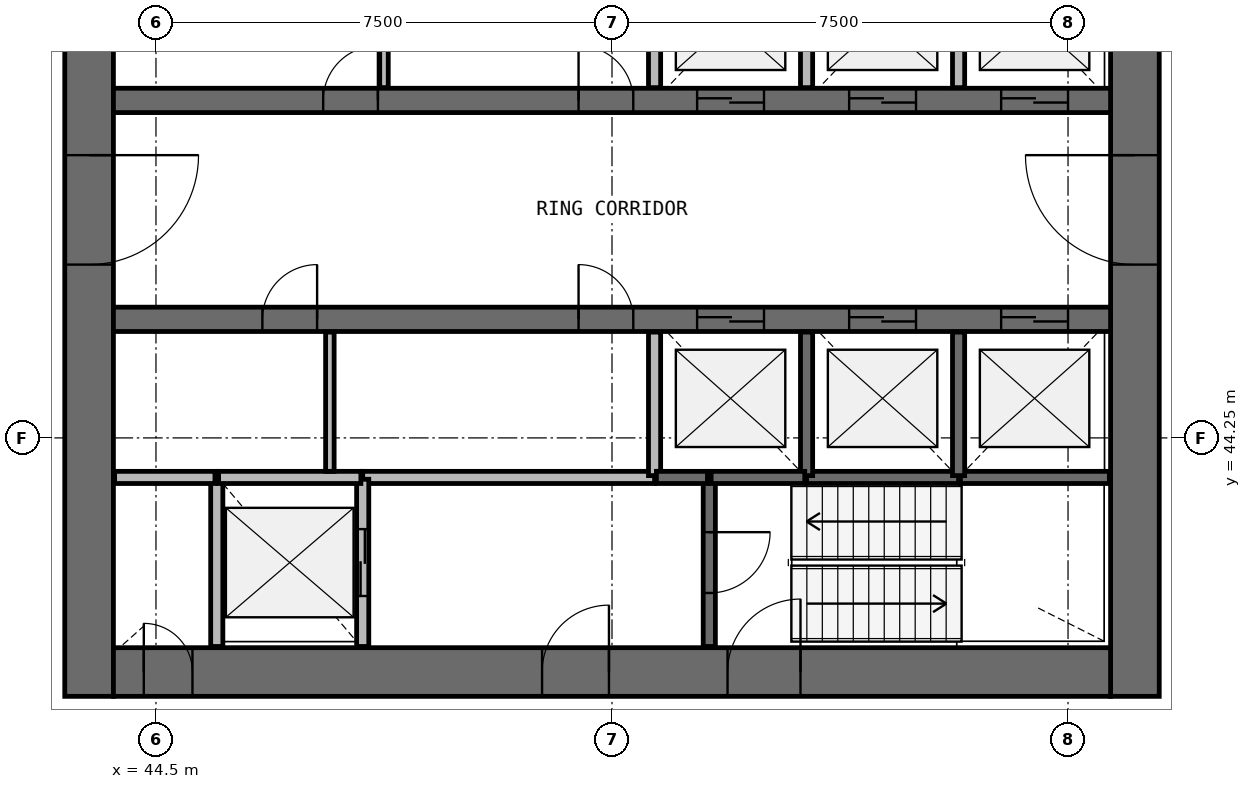
"""IFC4 building model, lengths in metres.
Left out: names, types, materials, properties, quantities, classifications, styles, units other than length and angle.
Written with IfcOpenShell. Run it as: python <this file> out.ifc"""

import sys

from ifc_helpers import new_model, si_unit, direction, frame, frame_2d, origin, place, context, subcontext, project, spatial, rectangle, extrude, source, transform, mapped, element, fill, save


model = new_model("IFC4")
c1 = context("Model", 3, precision=1e-05, world=origin(), true_north=direction((0.0, 1.0)))
c2 = subcontext(c1, "Body", "Model", "MODEL_VIEW")
j1 = project(units=[si_unit("LENGTHUNIT", "METRE"), si_unit("PLANEANGLEUNIT", "RADIAN")], contexts=[c1])
p1 = place(None, origin())
s1 = spatial("IfcSite", under=j1, at=p1, CompositionType="ELEMENT")
p2 = place(p1, origin())
s2 = spatial("IfcBuilding", under=s1, at=p2, CompositionType="ELEMENT")
p3 = place(p2, frame((0.0, 0.0, 156.5)))
s3 = spatial("IfcBuildingStorey", under=s2, at=p3, CompositionType="ELEMENT", Elevation=156.5)
p4 = place(p3, frame((60.6, 40.0, 0.0), z_axis=(0.0, 0.0, 1.0), x_axis=(0.0, 1.0, 0.0)))
e1 = element("IfcWall", 1, at=p4, inside=s3, PredefinedType="SHEAR", context=c2, shape_type="SweptSolid", body=[
    extrude(rectangle(XDim=16.0, YDim=0.8, at=frame_2d((8.0, 0.0))), origin(), (0.0, 0.0, 1.0), 3.9),
])
p5 = place(p4, frame((7.1, 0.0, 0.0)))
e2 = element("IfcOpeningElement", 2, at=p5, cuts=e1, PredefinedType="OPENING", context=c2, shape_type="SweptSolid", body=[
    extrude(rectangle(XDim=1.8, YDim=2.1, at=frame_2d((0.9, 1.05))), frame((0.0, 0.41, 0.0), z_axis=(0.0, -1.0, 0.0), x_axis=(1.0, 0.0, 0.0)), (0.0, 0.0, 1.0), 0.82),
])
p6 = place(p3, frame((43.4, 56.0, 0.0), z_axis=(0.0, 0.0, 1.0), x_axis=(0.0, -1.0, 0.0)))
e3 = element("IfcWall", 3, at=p6, inside=s3, PredefinedType="SHEAR", context=c2, shape_type="SweptSolid", body=[
    extrude(rectangle(XDim=16.0, YDim=0.8, at=frame_2d((8.0, 0.0))), origin(), (0.0, 0.0, 1.0), 3.9),
])
p7 = place(p6, frame((7.1, 0.0, 0.0)))
e4 = element("IfcOpeningElement", 4, at=p7, cuts=e3, PredefinedType="OPENING", context=c2, shape_type="SweptSolid", body=[
    extrude(rectangle(XDim=1.8, YDim=2.1, at=frame_2d((0.9, 1.05))), frame((0.0, 0.41, 0.0), z_axis=(0.0, -1.0, 0.0), x_axis=(1.0, 0.0, 0.0)), (0.0, 0.0, 1.0), 0.82),
])
p8 = place(p3, frame((43.8, 40.4, 0.0), z_axis=(0.0, 0.0, 1.0), x_axis=(1.0, 0.0, 0.0)))
e5 = element("IfcWall", 5, at=p8, inside=s3, PredefinedType="SHEAR", context=c2, shape_type="SweptSolid", body=[
    extrude(rectangle(XDim=16.4, YDim=0.8, at=frame_2d((8.2, 0.0))), origin(), (0.0, 0.0, 1.0), 3.9),
])
p9 = place(p8, frame((10.1, 0.0, 0.0)))
e6 = element("IfcOpeningElement", 6, at=p9, cuts=e5, PredefinedType="OPENING", context=c2, shape_type="SweptSolid", body=[
    extrude(rectangle(XDim=1.2, YDim=2.1, at=frame_2d((0.6, 1.05))), frame((0.0, 0.41, 0.0), z_axis=(0.0, -1.0, 0.0), x_axis=(1.0, 0.0, 0.0)), (0.0, 0.0, 1.0), 0.82),
])
p10 = place(p8, frame((7.05, 0.0, 0.0)))
e7 = element("IfcOpeningElement", 7, at=p10, cuts=e5, PredefinedType="OPENING", context=c2, shape_type="SweptSolid", body=[
    extrude(rectangle(XDim=1.1, YDim=2.1, at=frame_2d((0.55, 1.05))), frame((0.0, 0.41, 0.0), z_axis=(0.0, -1.0, 0.0), x_axis=(1.0, 0.0, 0.0)), (0.0, 0.0, 1.0), 0.82),
])
p11 = place(p8, frame((0.5, 0.0, 0.0)))
e8 = element("IfcOpeningElement", 8, at=p11, cuts=e5, PredefinedType="OPENING", context=c2, shape_type="SweptSolid", body=[
    extrude(rectangle(XDim=0.8, YDim=2.1, at=frame_2d((0.4, 1.05))), frame((0.0, 0.41, 0.0), z_axis=(0.0, -1.0, 0.0), x_axis=(1.0, 0.0, 0.0)), (0.0, 0.0, 1.0), 0.82),
])
p12 = place(p3, frame((43.8, 49.8, 0.0), z_axis=(0.0, 0.0, 1.0), x_axis=(1.0, 0.0, 0.0)))
e9 = element("IfcWall", 9, at=p12, inside=s3, PredefinedType="SHEAR", context=c2, shape_type="SweptSolid", body=[
    extrude(rectangle(XDim=16.4, YDim=0.4, at=frame_2d((8.2, 0.0))), origin(), (0.0, 0.0, 1.0), 3.9),
])
p13 = place(p12, frame((9.6, 0.0, 0.0)))
e10 = element("IfcOpeningElement", 10, at=p13, cuts=e9, PredefinedType="OPENING", context=c2, shape_type="SweptSolid", body=[
    extrude(rectangle(XDim=1.1, YDim=2.1, at=frame_2d((0.55, 1.05))), frame((0.0, 0.21, 0.0), z_axis=(0.0, -1.0, 0.0), x_axis=(1.0, 0.0, 0.0)), (0.0, 0.0, 1.0), 0.42),
])
p14 = place(p12, frame((12.1, 0.0, 0.0)))
e11 = element("IfcOpeningElement", 11, at=p14, cuts=e9, PredefinedType="OPENING", context=c2, shape_type="SweptSolid", body=[
    extrude(rectangle(XDim=1.1, YDim=2.1, at=frame_2d((0.55, 1.05))), frame((0.0, 0.21, 0.0), z_axis=(0.0, -1.0, 0.0), x_axis=(1.0, 0.0, 0.0)), (0.0, 0.0, 1.0), 0.42),
])
p15 = place(p12, frame((14.6, 0.0, 0.0)))
e12 = element("IfcOpeningElement", 12, at=p15, cuts=e9, PredefinedType="OPENING", context=c2, shape_type="SweptSolid", body=[
    extrude(rectangle(XDim=1.1, YDim=2.1, at=frame_2d((0.55, 1.05))), frame((0.0, 0.21, 0.0), z_axis=(0.0, -1.0, 0.0), x_axis=(1.0, 0.0, 0.0)), (0.0, 0.0, 1.0), 0.42),
])
p16 = place(p12, frame((3.45, 0.0, 0.0)))
e13 = element("IfcOpeningElement", 13, at=p16, cuts=e9, PredefinedType="OPENING", context=c2, shape_type="SweptSolid", body=[
    extrude(rectangle(XDim=0.9, YDim=2.1, at=frame_2d((0.45, 1.05))), frame((0.0, 0.21, 0.0), z_axis=(0.0, -1.0, 0.0), x_axis=(1.0, 0.0, 0.0)), (0.0, 0.0, 1.0), 0.42),
])
p17 = place(p12, frame((7.65, 0.0, 0.0)))
e14 = element("IfcOpeningElement", 14, at=p17, cuts=e9, PredefinedType="OPENING", context=c2, shape_type="SweptSolid", body=[
    extrude(rectangle(XDim=0.9, YDim=2.1, at=frame_2d((0.45, 1.05))), frame((0.0, 0.21, 0.0), z_axis=(0.0, -1.0, 0.0), x_axis=(1.0, 0.0, 0.0)), (0.0, 0.0, 1.0), 0.42),
])
p18 = place(p3, frame((43.8, 46.2, 0.0), z_axis=(0.0, 0.0, 1.0), x_axis=(1.0, 0.0, 0.0)))
e15 = element("IfcWall", 15, at=p18, inside=s3, PredefinedType="SHEAR", context=c2, shape_type="SweptSolid", body=[
    extrude(rectangle(XDim=16.4, YDim=0.4, at=frame_2d((8.2, 0.0))), origin(), (0.0, 0.0, 1.0), 3.9),
])
p19 = place(p18, frame((9.6, 0.0, 0.0)))
e16 = element("IfcOpeningElement", 16, at=p19, cuts=e15, PredefinedType="OPENING", context=c2, shape_type="SweptSolid", body=[
    extrude(rectangle(XDim=1.1, YDim=2.1, at=frame_2d((0.55, 1.05))), frame((0.0, 0.21, 0.0), z_axis=(0.0, -1.0, 0.0), x_axis=(1.0, 0.0, 0.0)), (0.0, 0.0, 1.0), 0.42),
])
p20 = place(p18, frame((12.1, 0.0, 0.0)))
e17 = element("IfcOpeningElement", 17, at=p20, cuts=e15, PredefinedType="OPENING", context=c2, shape_type="SweptSolid", body=[
    extrude(rectangle(XDim=1.1, YDim=2.1, at=frame_2d((0.55, 1.05))), frame((0.0, 0.21, 0.0), z_axis=(0.0, -1.0, 0.0), x_axis=(1.0, 0.0, 0.0)), (0.0, 0.0, 1.0), 0.42),
])
p21 = place(p18, frame((14.6, 0.0, 0.0)))
e18 = element("IfcOpeningElement", 18, at=p21, cuts=e15, PredefinedType="OPENING", context=c2, shape_type="SweptSolid", body=[
    extrude(rectangle(XDim=1.1, YDim=2.1, at=frame_2d((0.55, 1.05))), frame((0.0, 0.21, 0.0), z_axis=(0.0, -1.0, 0.0), x_axis=(1.0, 0.0, 0.0)), (0.0, 0.0, 1.0), 0.42),
])
p22 = place(p18, frame((2.45, 0.0, 0.0)))
e19 = element("IfcOpeningElement", 19, at=p22, cuts=e15, PredefinedType="OPENING", context=c2, shape_type="SweptSolid", body=[
    extrude(rectangle(XDim=0.9, YDim=2.1, at=frame_2d((0.45, 1.05))), frame((0.0, 0.21, 0.0), z_axis=(0.0, -1.0, 0.0), x_axis=(1.0, 0.0, 0.0)), (0.0, 0.0, 1.0), 0.42),
])
p23 = place(p18, frame((7.65, 0.0, 0.0)))
e20 = element("IfcOpeningElement", 20, at=p23, cuts=e15, PredefinedType="OPENING", context=c2, shape_type="SweptSolid", body=[
    extrude(rectangle(XDim=0.9, YDim=2.1, at=frame_2d((0.45, 1.05))), frame((0.0, 0.21, 0.0), z_axis=(0.0, -1.0, 0.0), x_axis=(1.0, 0.0, 0.0)), (0.0, 0.0, 1.0), 0.42),
])
p24 = place(p3, frame((52.7, 43.6, 0.0), z_axis=(0.0, 0.0, 1.0), x_axis=(-1.0, 0.0, 0.0)))
e21 = element("IfcWall", 21, at=p24, inside=s3, PredefinedType="SOLIDWALL", context=c2, shape_type="SweptSolid", body=[
    extrude(rectangle(XDim=4.8, YDim=0.2, at=frame_2d((2.4, 0.0))), origin(), (0.0, 0.0, 1.0), 3.58),
])
p25 = place(p3, frame((45.5, 43.6, 0.0), z_axis=(0.0, 0.0, 1.0), x_axis=(0.0, -1.0, 0.0)))
e22 = element("IfcWall", 22, at=p25, inside=s3, PredefinedType="SOLIDWALL", context=c2, shape_type="SweptSolid", body=[
    extrude(rectangle(XDim=2.78, YDim=0.2, at=frame_2d((1.39, 0.0))), origin(), (0.0, 0.0, 1.0), 3.58),
])
p26 = place(p3, frame((47.9, 40.82, 0.0), z_axis=(0.0, 0.0, 1.0), x_axis=(0.0, 1.0, 0.0)))
e23 = element("IfcWall", 23, at=p26, inside=s3, PredefinedType="SOLIDWALL", context=c2, shape_type="SweptSolid", body=[
    extrude(rectangle(XDim=2.75, YDim=0.2, at=frame_2d((1.375, 0.0))), origin(), (0.0, 0.0, 1.0), 3.58),
])
p27 = place(p26, frame((0.83, 0.0, 0.0)))
e24 = element("IfcOpeningElement", 24, at=p27, cuts=e23, PredefinedType="OPENING", context=c2, shape_type="SweptSolid", body=[
    extrude(rectangle(XDim=1.1, YDim=2.1, at=frame_2d((0.55, 1.05))), frame((0.0, 0.11, 0.0), z_axis=(0.0, -1.0, 0.0), x_axis=(1.0, 0.0, 0.0)), (0.0, 0.0, 1.0), 0.22),
])
p28 = place(p3, frame((53.6, 43.6, 0.0), z_axis=(0.0, 0.0, 1.0), x_axis=(0.0, -1.0, 0.0)))
e25 = element("IfcWall", 25, at=p28, inside=s3, PredefinedType="SOLIDWALL", context=c2, shape_type="SweptSolid", body=[
    extrude(rectangle(XDim=2.78, YDim=0.2, at=frame_2d((1.39, 0.0))), origin(), (0.0, 0.0, 1.0), 3.58),
])
p29 = place(p28, frame((0.9, 0.0, 0.0)))
e26 = element("IfcOpeningElement", 26, at=p29, cuts=e25, PredefinedType="OPENING", context=c2, shape_type="SweptSolid", body=[
    extrude(rectangle(XDim=1.0, YDim=2.1, at=frame_2d((0.5, 1.05))), frame((0.0, 0.11, 0.0), z_axis=(0.0, -1.0, 0.0), x_axis=(1.0, 0.0, 0.0)), (0.0, 0.0, 1.0), 0.22),
])
p30 = place(p3, frame((55.2, 43.6, 0.0), z_axis=(0.0, 0.0, 1.0), x_axis=(1.0, 0.0, 0.0)))
e27 = element("IfcWall", 27, at=p30, inside=s3, PredefinedType="SOLIDWALL", context=c2, shape_type="SweptSolid", body=[
    extrude(rectangle(XDim=2.5, YDim=0.2, at=frame_2d((1.25, 0.0))), origin(), (0.0, 0.0, 1.0), 3.58),
])
p31 = place(p3, frame((57.73, 43.6, 0.0), z_axis=(0.0, 0.0, 1.0), x_axis=(1.0, 0.0, 0.0)))
e28 = element("IfcWall", 28, at=p31, inside=s3, PredefinedType="SOLIDWALL", context=c2, shape_type="SweptSolid", body=[
    extrude(rectangle(XDim=2.45, YDim=0.2, at=frame_2d((1.225, 0.0))), origin(), (0.0, 0.0, 1.0), 3.58),
])
p32 = place(p3, frame((47.87, 43.6, 0.0), z_axis=(0.0, 0.0, 1.0), x_axis=(-1.0, 0.0, 0.0)))
e29 = element("IfcWall", 29, at=p32, inside=s3, PredefinedType="SOLIDWALL", context=c2, shape_type="SweptSolid", body=[
    extrude(rectangle(XDim=2.34, YDim=0.2, at=frame_2d((1.17, 0.0))), origin(), (0.0, 0.0, 1.0), 3.58),
])
for number, where, z_axis, x_axis in (
    (30, (52.7, 45.99, 0.0), (0.0, 0.0, 1.0), (0.0, -1.0, 0.0)),
    (31, (52.7, 52.37, 0.0), (0.0, 0.0, 1.0), (0.0, -1.0, 0.0)),
    (32, (55.2, 43.63, 0.0), (0.0, 0.0, 1.0), (0.0, 1.0, 0.0)),
    (33, (55.2, 50.01, 0.0), (0.0, 0.0, 1.0), (0.0, 1.0, 0.0)),
    (34, (57.7, 43.63, 0.0), (0.0, 0.0, 1.0), (0.0, 1.0, 0.0)),
):
    element("IfcWall", number, at=place(p3, frame(where, z_axis=z_axis, x_axis=x_axis)), inside=s3, PredefinedType="SOLIDWALL", context=c2, shape_type="SweptSolid", body=[
        extrude(rectangle(XDim=2.36, YDim=0.2, at=frame_2d((1.18, 0.0))), origin(), (0.0, 0.0, 1.0), 3.58),
    ])
p33 = place(p3, frame((57.7, 50.01, 0.0), z_axis=(0.0, 0.0, 1.0), x_axis=(0.0, 1.0, 0.0)))
e35 = element("IfcWall", 35, at=p33, inside=s3, PredefinedType="SOLIDWALL", context=c2, shape_type="SweptSolid", body=[
    extrude(rectangle(XDim=2.39, YDim=0.2, at=frame_2d((1.195, 0.0))), origin(), (0.0, 0.0, 1.0), 3.58),
])
p34 = place(p3, frame((45.47, 43.6, 0.0), z_axis=(0.0, 0.0, 1.0), x_axis=(-1.0, 0.0, 0.0)))
e36 = element("IfcWall", 36, at=p34, inside=s3, PredefinedType="SOLIDWALL", context=c2, shape_type="SweptSolid", body=[
    extrude(rectangle(XDim=1.65, YDim=0.2, at=frame_2d((0.825, 0.0))), origin(), (0.0, 0.0, 1.0), 3.58),
])
p35 = place(p3, frame((53.63, 43.6, 0.0), z_axis=(0.0, 0.0, 1.0), x_axis=(1.0, 0.0, 0.0)))
e37 = element("IfcWall", 37, at=p35, inside=s3, PredefinedType="SOLIDWALL", context=c2, shape_type="SweptSolid", body=[
    extrude(rectangle(XDim=1.54, YDim=0.2, at=frame_2d((0.77, 0.0))), origin(), (0.0, 0.0, 1.0), 3.58),
])
p36 = place(p3, frame((52.73, 43.6, 0.0), z_axis=(0.0, 0.0, 1.0), x_axis=(1.0, 0.0, 0.0)))
e38 = element("IfcWall", 38, at=p36, inside=s3, PredefinedType="SOLIDWALL", context=c2, shape_type="SweptSolid", body=[
    extrude(rectangle(XDim=0.84, YDim=0.2, at=frame_2d((0.42, 0.0))), origin(), (0.0, 0.0, 1.0), 3.58),
])
for number, where, z_axis, x_axis in (
    (39, (47.36, 43.7, 0.0), (0.0, 0.0, 1.0), (0.0, 1.0, 0.0)),
    (40, (48.25, 50.01, 0.0), (0.0, 0.0, 1.0), (0.0, 1.0, 0.0)),
):
    element("IfcWall", number, at=place(p3, frame(where, z_axis=z_axis, x_axis=x_axis)), inside=s3, PredefinedType="PARTITIONING", context=c2, shape_type="SweptSolid", body=[
        extrude(rectangle(XDim=2.29, YDim=0.14, at=frame_2d((1.145, 0.0))), origin(), (0.0, 0.0, 1.0), 2.88),
    ])
m1 = source(origin(), c2, "Body", "SweptSolid", [
    extrude(rectangle(XDim=1.8, YDim=2.1, at=frame_2d((0.9, 1.05))), frame((0.0, 0.025, 0.0), z_axis=(0.0, -1.0, 0.0), x_axis=(1.0, 0.0, 0.0)), (0.0, 0.0, 1.0), 0.05),
])
p37 = place(p7, origin())
e41 = element("IfcDoor", 41, at=p37, inside=s3, OperationType="SINGLE_SWING_LEFT", PredefinedType="DOOR", context=c2, shape_type="MappedRepresentation", body=[
    mapped(m1, transform((0.0, 0.0, 0.0), scale=1.0)),
])
fill(e4, e41)
p38 = place(p5, origin())
e42 = element("IfcDoor", 42, at=p38, inside=s3, OperationType="SINGLE_SWING_RIGHT", PredefinedType="DOOR", context=c2, shape_type="MappedRepresentation", body=[
    mapped(m1, transform((0.0, 0.0, 0.0), scale=1.0)),
])
fill(e2, e42)
m2 = source(origin(), c2, "Body", "SweptSolid", [
    extrude(rectangle(XDim=1.1, YDim=2.1, at=frame_2d((0.55, 1.05))), frame((0.0, 0.025, 0.0), z_axis=(0.0, -1.0, 0.0), x_axis=(1.0, 0.0, 0.0)), (0.0, 0.0, 1.0), 0.05),
])
p39 = place(p13, origin())
e43 = element("IfcDoor", 43, at=p39, inside=s3, OperationType="DOUBLE_DOOR_SLIDING", PredefinedType="USERDEFINED", context=c2, shape_type="MappedRepresentation", body=[
    mapped(m2, transform((0.0, 0.0, 0.0), scale=1.0)),
])
fill(e10, e43)
p40 = place(p14, origin())
e44 = element("IfcDoor", 44, at=p40, inside=s3, OperationType="DOUBLE_DOOR_SLIDING", PredefinedType="USERDEFINED", context=c2, shape_type="MappedRepresentation", body=[
    mapped(m2, transform((0.0, 0.0, 0.0), scale=1.0)),
])
fill(e11, e44)
p41 = place(p15, origin())
e45 = element("IfcDoor", 45, at=p41, inside=s3, OperationType="DOUBLE_DOOR_SLIDING", PredefinedType="USERDEFINED", context=c2, shape_type="MappedRepresentation", body=[
    mapped(m2, transform((0.0, 0.0, 0.0), scale=1.0)),
])
fill(e12, e45)
p42 = place(p19, origin())
e46 = element("IfcDoor", 46, at=p42, inside=s3, OperationType="DOUBLE_DOOR_SLIDING", PredefinedType="USERDEFINED", context=c2, shape_type="MappedRepresentation", body=[
    mapped(m2, transform((0.0, 0.0, 0.0), scale=1.0)),
])
fill(e16, e46)
p43 = place(p20, origin())
e47 = element("IfcDoor", 47, at=p43, inside=s3, OperationType="DOUBLE_DOOR_SLIDING", PredefinedType="USERDEFINED", context=c2, shape_type="MappedRepresentation", body=[
    mapped(m2, transform((0.0, 0.0, 0.0), scale=1.0)),
])
fill(e17, e47)
p44 = place(p21, origin())
e48 = element("IfcDoor", 48, at=p44, inside=s3, OperationType="DOUBLE_DOOR_SLIDING", PredefinedType="USERDEFINED", context=c2, shape_type="MappedRepresentation", body=[
    mapped(m2, transform((0.0, 0.0, 0.0), scale=1.0)),
])
fill(e18, e48)
p45 = place(p27, origin())
e49 = element("IfcDoor", 49, at=p45, inside=s3, OperationType="DOUBLE_DOOR_SLIDING", PredefinedType="USERDEFINED", context=c2, shape_type="MappedRepresentation", body=[
    mapped(m2, transform((0.0, 0.0, 0.0), scale=1.0)),
])
fill(e24, e49)
m3 = source(origin(), c2, "Body", "SweptSolid", [
    extrude(rectangle(XDim=1.2, YDim=2.1, at=frame_2d((0.6, 1.05))), frame((0.0, 0.025, 0.0), z_axis=(0.0, -1.0, 0.0), x_axis=(1.0, 0.0, 0.0)), (0.0, 0.0, 1.0), 0.05),
])
p46 = place(p9, origin())
e50 = element("IfcDoor", 50, at=p46, inside=s3, OperationType="SINGLE_SWING_RIGHT", PredefinedType="DOOR", context=c2, shape_type="MappedRepresentation", body=[
    mapped(m3, transform((0.0, 0.0, 0.0), scale=1.0)),
])
fill(e6, e50)
m4 = source(origin(), c2, "Body", "SweptSolid", [
    extrude(rectangle(XDim=1.0, YDim=2.1, at=frame_2d((0.5, 1.05))), frame((0.0, 0.025, 0.0), z_axis=(0.0, -1.0, 0.0), x_axis=(1.0, 0.0, 0.0)), (0.0, 0.0, 1.0), 0.05),
])
p47 = place(p29, origin())
e51 = element("IfcDoor", 51, at=p47, inside=s3, OperationType="SINGLE_SWING_LEFT", PredefinedType="DOOR", context=c2, shape_type="MappedRepresentation", body=[
    mapped(m4, transform((0.0, 0.0, 0.0), scale=1.0)),
])
fill(e26, e51)
m5 = source(origin(), c2, "Body", "SweptSolid", [
    extrude(rectangle(XDim=1.1, YDim=2.1, at=frame_2d((0.55, 1.05))), frame((0.0, 0.025, 0.0), z_axis=(0.0, -1.0, 0.0), x_axis=(1.0, 0.0, 0.0)), (0.0, 0.0, 1.0), 0.05),
])
p48 = place(p10, origin())
e52 = element("IfcDoor", 52, at=p48, inside=s3, OperationType="SINGLE_SWING_RIGHT", PredefinedType="DOOR", context=c2, shape_type="MappedRepresentation", body=[
    mapped(m5, transform((0.0, 0.0, 0.0), scale=1.0)),
])
fill(e7, e52)
m6 = source(origin(), c2, "Body", "SweptSolid", [
    extrude(rectangle(XDim=0.8, YDim=2.1, at=frame_2d((0.4, 1.05))), frame((0.0, 0.025, 0.0), z_axis=(0.0, -1.0, 0.0), x_axis=(1.0, 0.0, 0.0)), (0.0, 0.0, 1.0), 0.05),
])
p49 = place(p11, origin())
e53 = element("IfcDoor", 53, at=p49, inside=s3, OperationType="SINGLE_SWING_LEFT", PredefinedType="DOOR", context=c2, shape_type="MappedRepresentation", body=[
    mapped(m6, transform((0.0, 0.0, 0.0), scale=1.0)),
])
fill(e8, e53)
m7 = source(origin(), c2, "Body", "SweptSolid", [
    extrude(rectangle(XDim=0.9, YDim=2.1, at=frame_2d((0.45, 1.05))), frame((0.0, 0.025, 0.0), z_axis=(0.0, -1.0, 0.0), x_axis=(1.0, 0.0, 0.0)), (0.0, 0.0, 1.0), 0.05),
])
p50 = place(p16, origin())
e54 = element("IfcDoor", 54, at=p50, inside=s3, OperationType="SINGLE_SWING_RIGHT", PredefinedType="DOOR", context=c2, shape_type="MappedRepresentation", body=[
    mapped(m7, transform((0.0, 0.0, 0.0), scale=1.0)),
])
fill(e13, e54)
p51 = place(p17, origin())
e55 = element("IfcDoor", 55, at=p51, inside=s3, OperationType="SINGLE_SWING_LEFT", PredefinedType="DOOR", context=c2, shape_type="MappedRepresentation", body=[
    mapped(m7, transform((0.0, 0.0, 0.0), scale=1.0)),
])
fill(e14, e55)
p52 = place(p22, origin())
e56 = element("IfcDoor", 56, at=p52, inside=s3, OperationType="SINGLE_SWING_RIGHT", PredefinedType="DOOR", context=c2, shape_type="MappedRepresentation", body=[
    mapped(m7, transform((0.0, 0.0, 0.0), scale=1.0)),
])
fill(e19, e56)
p53 = place(p23, origin())
e57 = element("IfcDoor", 57, at=p53, inside=s3, OperationType="SINGLE_SWING_LEFT", PredefinedType="DOOR", context=c2, shape_type="MappedRepresentation", body=[
    mapped(m7, transform((0.0, 0.0, 0.0), scale=1.0)),
])
fill(e20, e57)
save(model, sys.argv[1])
